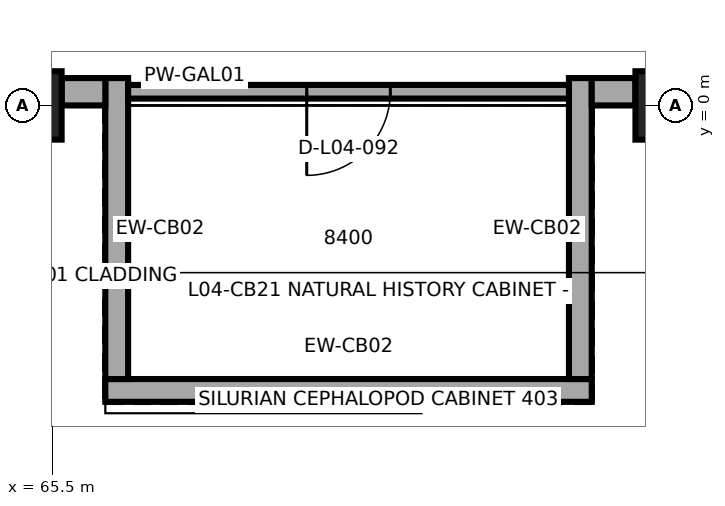
"""IFC4 building model, lengths in metres.
Left out: names, types, materials, properties, quantities, classifications, styles, units other than length and angle.
Written with IfcOpenShell. Run it as: python <this file> out.ifc"""

import sys

from ifc_helpers import new_model, si_unit, direction, frame, frame_2d, origin, origin_2d, place, context, subcontext, project, spatial, rectangle, extrude, element, fill, save


model = new_model("IFC4")
c1 = context("Model", 3, precision=1e-05, world=origin(), true_north=direction((0.0, 1.0)))
c2 = subcontext(c1, "Body", "Model", "MODEL_VIEW")
j1 = project(units=[si_unit("LENGTHUNIT", "METRE"), si_unit("PLANEANGLEUNIT", "RADIAN")], contexts=[c1])
p1 = place(None, origin())
s1 = spatial("IfcSite", under=j1, at=p1, CompositionType="ELEMENT")
p2 = place(p1, origin())
s2 = spatial("IfcBuilding", under=s1, at=p2, CompositionType="ELEMENT")
p3 = place(p2, frame((0.0, 0.0, 21.9)))
s3 = spatial("IfcBuildingStorey", under=s2, at=p3, CompositionType="ELEMENT", Elevation=21.9)
for number, where, z_axis, x_axis in (
    (1, (65.2, 0.0, 0.0), (0.0, 0.0, 1.0), (1.0, 0.0, 0.0)),
    (2, (73.6, 0.0, 0.0), (0.0, 0.0, 1.0), (1.0, 0.0, 0.0)),
):
    element("IfcColumn", number, at=place(p3, frame(where, z_axis=z_axis, x_axis=x_axis)), inside=s3, PredefinedType="COLUMN", context=c2, shape_type="SweptSolid", body=[
        extrude(rectangle(XDim=0.85, YDim=0.9, at=origin_2d()), origin(), (0.0, 0.0, 1.0), 4.5),
    ])
p4 = place(p3, frame((66.2, -3.75, 0.0), z_axis=(0.0, 0.0, 1.0), x_axis=(1.0, 0.0, 0.0)))
e3 = element("IfcWall", 3, at=p4, inside=s3, PredefinedType="SOLIDWALL", context=c2, shape_type="SweptSolid", body=[
    extrude(rectangle(XDim=6.4, YDim=0.3, at=frame_2d((3.2, 0.0))), origin(), (0.0, 0.0, 1.0), 2.99),
])
for number, where, z_axis, x_axis in (
    (4, (66.35, 0.36, 0.0), (0.0, 0.0, 1.0), (0.0, -1.0, 0.0)),
    (5, (72.45, -3.6, 0.0), (0.0, 0.0, 1.0), (0.0, 1.0, 0.0)),
):
    element("IfcWall", number, at=place(p3, frame(where, z_axis=z_axis, x_axis=x_axis)), inside=s3, PredefinedType="SOLIDWALL", context=c2, shape_type="SweptSolid", body=[
        extrude(rectangle(XDim=3.96, YDim=0.3, at=frame_2d((1.98, 0.0))), origin(), (0.0, 0.0, 1.0), 2.99),
    ])
for number, where, z_axis, x_axis in (
    (6, (65.625, 0.18, 0.0), (0.0, 0.0, 1.0), (1.0, 0.0, 0.0)),
    (7, (72.6, 0.18, 0.0), (0.0, 0.0, 1.0), (1.0, 0.0, 0.0)),
):
    element("IfcWall", number, at=place(p3, frame(where, z_axis=z_axis, x_axis=x_axis)), inside=s3, PredefinedType="SOLIDWALL", context=c2, shape_type="SweptSolid", body=[
        extrude(rectangle(XDim=0.575, YDim=0.36, at=frame_2d((0.288, 0.0))), origin(), (0.0, 0.0, 1.0), 3.335),
    ])
p5 = place(p3, frame((66.5, 0.18, 0.0), z_axis=(0.0, 0.0, 1.0), x_axis=(1.0, 0.0, 0.0)))
e8 = element("IfcWall", 8, at=p5, inside=s3, PredefinedType="PARTITIONING", context=c2, shape_type="SweptSolid", body=[
    extrude(rectangle(XDim=5.8, YDim=0.18, at=frame_2d((2.9, 0.0))), origin(), (0.0, 0.0, 1.0), 2.99),
])
p6 = place(p5, frame((2.35, 0.0, 0.0)))
e9 = element("IfcOpeningElement", 9, at=p6, cuts=e8, PredefinedType="OPENING", context=c2, shape_type="SweptSolid", body=[
    extrude(rectangle(XDim=1.1, YDim=2.2, at=frame_2d((0.55, 1.1))), frame((0.0, 0.1, 0.0), z_axis=(0.0, -1.0, 0.0), x_axis=(1.0, 0.0, 0.0)), (0.0, 0.0, 1.0), 0.2),
])
p7 = place(p6, origin())
e10 = element("IfcDoor", 10, at=p7, inside=s3, OperationType="SINGLE_SWING_RIGHT", PredefinedType="DOOR", context=c2, shape_type="SweptSolid", body=[
    extrude(rectangle(XDim=1.1, YDim=2.2, at=frame_2d((0.55, 1.1))), frame((0.0, 0.025, 0.0), z_axis=(0.0, -1.0, 0.0), x_axis=(1.0, 0.0, 0.0)), (0.0, 0.0, 1.0), 0.05),
])
fill(e9, e10)
save(model, sys.argv[1])
